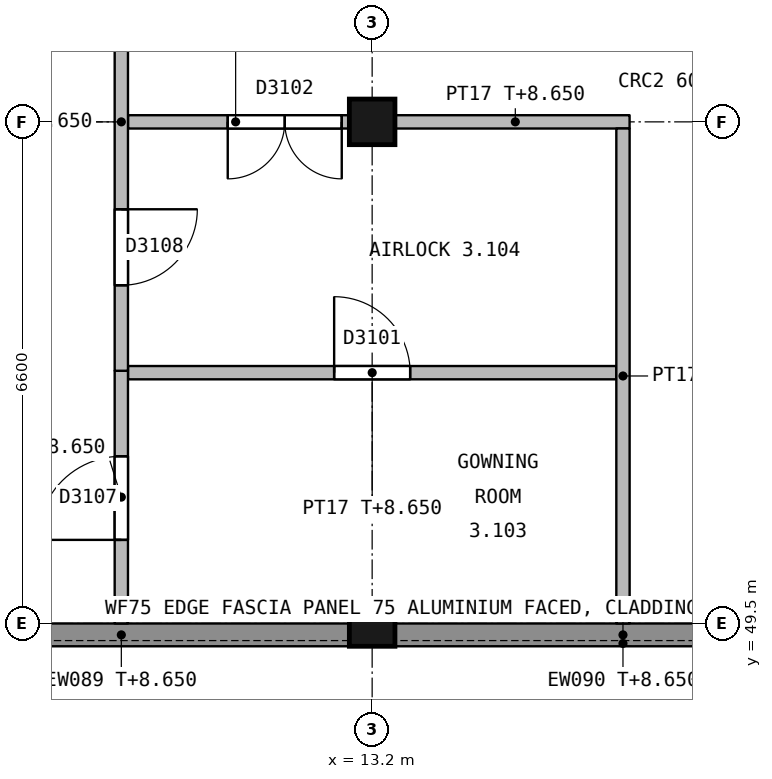
"""IFC4 building model, lengths in metres.
Left out: names, types, materials, properties, quantities, classifications, styles, units other than length and angle.
Written with IfcOpenShell. Run it as: python <this file> out.ifc"""

import sys

from ifc_helpers import new_model, si_unit, direction, frame, frame_2d, origin, origin_2d, place, context, subcontext, project, spatial, rectangle, extrude, element, fill, save


model = new_model("IFC4")
c1 = context("Model", 3, precision=1e-05, world=origin(), true_north=direction((0.0, 1.0)))
c2 = subcontext(c1, "Body", "Model", "MODEL_VIEW")
j1 = project(units=[si_unit("LENGTHUNIT", "METRE"), si_unit("PLANEANGLEUNIT", "RADIAN")], contexts=[c1])
p1 = place(None, origin())
s1 = spatial("IfcSite", under=j1, at=p1, CompositionType="ELEMENT")
p2 = place(p1, origin())
s2 = spatial("IfcBuilding", under=s1, at=p2, CompositionType="ELEMENT")
p3 = place(p2, frame((0.0, 0.0, 5.4)))
s3 = spatial("IfcBuildingStorey", under=s2, at=p3, CompositionType="ELEMENT", Elevation=5.4)
for number, where, z_axis, x_axis in (
    (1, (13.2, 49.5, 0.0), (0.0, 0.0, 1.0), (1.0, 0.0, 0.0)),
    (2, (13.2, 56.1, 0.0), (0.0, 0.0, 1.0), (1.0, 0.0, 0.0)),
):
    element("IfcColumn", number, at=place(p3, frame(where, z_axis=z_axis, x_axis=x_axis)), inside=s3, PredefinedType="COLUMN", context=c2, shape_type="SweptSolid", body=[
        extrude(rectangle(XDim=0.6, YDim=0.6, at=origin_2d()), origin(), (0.0, 0.0, 1.0), 4.5),
    ])
p4 = place(p3, frame((12.9, 49.35, 0.0), z_axis=(0.0, 0.0, 1.0), x_axis=(-1.0, 0.0, 0.0)))
e3 = element("IfcWall", 3, at=p4, inside=s3, PredefinedType="STANDARD", context=c2, shape_type="SweptSolid", body=[
    extrude(rectangle(XDim=6.0, YDim=0.3, at=frame_2d((3.0, 0.0))), origin(), (0.0, 0.0, 1.0), 3.25),
])
p5 = place(p4, frame((4.05, 0.0, 1.1)))
e4 = element("IfcOpeningElement", 4, at=p5, cuts=e3, PredefinedType="OPENING", context=c2, shape_type="SweptSolid", body=[
    extrude(rectangle(XDim=1.2, YDim=1.2, at=frame_2d((0.6, 0.6))), frame((0.0, 0.16, 0.0), z_axis=(0.0, -1.0, 0.0), x_axis=(1.0, 0.0, 0.0)), (0.0, 0.0, 1.0), 0.32),
])
p6 = place(p3, frame((19.5, 49.35, 0.0), z_axis=(0.0, 0.0, 1.0), x_axis=(-1.0, 0.0, 0.0)))
e5 = element("IfcWall", 5, at=p6, inside=s3, PredefinedType="STANDARD", context=c2, shape_type="SweptSolid", body=[
    extrude(rectangle(XDim=6.0, YDim=0.3, at=frame_2d((3.0, 0.0))), origin(), (0.0, 0.0, 1.0), 3.25),
])
p7 = place(p3, frame((16.413, 52.8, 0.0), z_axis=(0.0, 0.0, 1.0), x_axis=(-1.0, 0.0, 0.0)))
e6 = element("IfcWall", 6, at=p7, inside=s3, PredefinedType="PARTITIONING", context=c2, shape_type="SweptSolid", body=[
    extrude(rectangle(XDim=6.425, YDim=0.175, at=frame_2d((3.212, 0.0))), origin(), (0.0, 0.0, 1.0), 3.25),
])
p8 = place(p7, frame((2.713, 0.0, 0.0)))
e7 = element("IfcOpeningElement", 7, at=p8, cuts=e6, PredefinedType="OPENING", context=c2, shape_type="SweptSolid", body=[
    extrude(rectangle(XDim=1.0, YDim=2.1, at=frame_2d((0.5, 1.05))), frame((0.0, 0.097, 0.0), z_axis=(0.0, -1.0, 0.0), x_axis=(1.0, 0.0, 0.0)), (0.0, 0.0, 1.0), 0.195),
])
p9 = place(p3, frame((12.9, 56.1, 0.0), z_axis=(0.0, 0.0, 1.0), x_axis=(-1.0, 0.0, 0.0)))
e8 = element("IfcWall", 8, at=p9, inside=s3, PredefinedType="PARTITIONING", context=c2, shape_type="SweptSolid", body=[
    extrude(rectangle(XDim=2.912, YDim=0.175, at=frame_2d((1.456, 0.0))), origin(), (0.0, 0.0, 1.0), 3.25),
])
p10 = place(p9, frame((0.1, 0.0, 0.0)))
e9 = element("IfcOpeningElement", 9, at=p10, cuts=e8, PredefinedType="OPENING", context=c2, shape_type="SweptSolid", body=[
    extrude(rectangle(XDim=1.5, YDim=2.1, at=frame_2d((0.75, 1.05))), frame((0.0, 0.097, 0.0), z_axis=(0.0, -1.0, 0.0), x_axis=(1.0, 0.0, 0.0)), (0.0, 0.0, 1.0), 0.195),
])
p11 = place(p3, frame((13.5, 56.1, 0.0), z_axis=(0.0, 0.0, 1.0), x_axis=(1.0, 0.0, 0.0)))
e10 = element("IfcWall", 10, at=p11, inside=s3, PredefinedType="PARTITIONING", context=c2, shape_type="SweptSolid", body=[
    extrude(rectangle(XDim=3.087, YDim=0.175, at=frame_2d((1.543, 0.0))), origin(), (0.0, 0.0, 1.0), 3.25),
])
p12 = place(p3, frame((9.9, 52.825, 0.0), z_axis=(0.0, 0.0, 1.0), x_axis=(0.0, -1.0, 0.0)))
e11 = element("IfcWall", 11, at=p12, inside=s3, PredefinedType="PARTITIONING", context=c2, shape_type="SweptSolid", body=[
    extrude(rectangle(XDim=3.325, YDim=0.175, at=frame_2d((1.663, 0.0))), origin(), (0.0, 0.0, 1.0), 3.25),
])
p13 = place(p12, frame((1.125, 0.0, 0.0)))
e12 = element("IfcOpeningElement", 12, at=p13, cuts=e11, PredefinedType="OPENING", context=c2, shape_type="SweptSolid", body=[
    extrude(rectangle(XDim=1.1, YDim=2.1, at=frame_2d((0.55, 1.05))), frame((0.0, 0.097, 0.0), z_axis=(0.0, -1.0, 0.0), x_axis=(1.0, 0.0, 0.0)), (0.0, 0.0, 1.0), 0.195),
])
p14 = place(p3, frame((9.9, 52.825, 0.0), z_axis=(0.0, 0.0, 1.0), x_axis=(0.0, 1.0, 0.0)))
e13 = element("IfcWall", 13, at=p14, inside=s3, PredefinedType="PARTITIONING", context=c2, shape_type="SweptSolid", body=[
    extrude(rectangle(XDim=6.55, YDim=0.175, at=frame_2d((3.275, 0.0))), origin(), (0.0, 0.0, 1.0), 3.25),
])
p15 = place(p14, frame((1.125, 0.0, 0.0)))
e14 = element("IfcOpeningElement", 14, at=p15, cuts=e13, PredefinedType="OPENING", context=c2, shape_type="SweptSolid", body=[
    extrude(rectangle(XDim=1.0, YDim=2.1, at=frame_2d((0.5, 1.05))), frame((0.0, 0.097, 0.0), z_axis=(0.0, -1.0, 0.0), x_axis=(1.0, 0.0, 0.0)), (0.0, 0.0, 1.0), 0.195),
])
p16 = place(p3, frame((16.5, 49.5, 0.0), z_axis=(0.0, 0.0, 1.0), x_axis=(0.0, 1.0, 0.0)))
e15 = element("IfcWall", 15, at=p16, inside=s3, PredefinedType="PARTITIONING", context=c2, shape_type="SweptSolid", body=[
    extrude(rectangle(XDim=6.513, YDim=0.175, at=frame_2d((3.256, 0.0))), origin(), (0.0, 0.0, 1.0), 3.25),
])
p17 = place(p8, origin())
e16 = element("IfcDoor", 16, at=p17, inside=s3, OperationType="SINGLE_SWING_RIGHT", PredefinedType="DOOR", context=c2, shape_type="SweptSolid", body=[
    extrude(rectangle(XDim=1.0, YDim=2.1, at=frame_2d((0.5, 1.05))), frame((0.0, 0.025, 0.0), z_axis=(0.0, -1.0, 0.0), x_axis=(1.0, 0.0, 0.0)), (0.0, 0.0, 1.0), 0.05),
])
fill(e7, e16)
p18 = place(p10, origin())
e17 = element("IfcDoor", 17, at=p18, inside=s3, OperationType="DOUBLE_DOOR_SINGLE_SWING", PredefinedType="DOOR", context=c2, shape_type="SweptSolid", body=[
    extrude(rectangle(XDim=1.5, YDim=2.1, at=frame_2d((0.75, 1.05))), frame((0.0, 0.025, 0.0), z_axis=(0.0, -1.0, 0.0), x_axis=(1.0, 0.0, 0.0)), (0.0, 0.0, 1.0), 0.05),
])
fill(e9, e17)
p19 = place(p13, origin())
e18 = element("IfcDoor", 18, at=p19, inside=s3, OperationType="SINGLE_SWING_RIGHT", PredefinedType="DOOR", context=c2, shape_type="SweptSolid", body=[
    extrude(rectangle(XDim=1.1, YDim=2.1, at=frame_2d((0.55, 1.05))), frame((0.0, 0.025, 0.0), z_axis=(0.0, -1.0, 0.0), x_axis=(1.0, 0.0, 0.0)), (0.0, 0.0, 1.0), 0.05),
])
fill(e12, e18)
p20 = place(p15, origin())
e19 = element("IfcDoor", 19, at=p20, inside=s3, OperationType="SINGLE_SWING_RIGHT", PredefinedType="DOOR", context=c2, shape_type="SweptSolid", body=[
    extrude(rectangle(XDim=1.0, YDim=2.1, at=frame_2d((0.5, 1.05))), frame((0.0, 0.025, 0.0), z_axis=(0.0, -1.0, 0.0), x_axis=(1.0, 0.0, 0.0)), (0.0, 0.0, 1.0), 0.05),
])
fill(e14, e19)
save(model, sys.argv[1])
